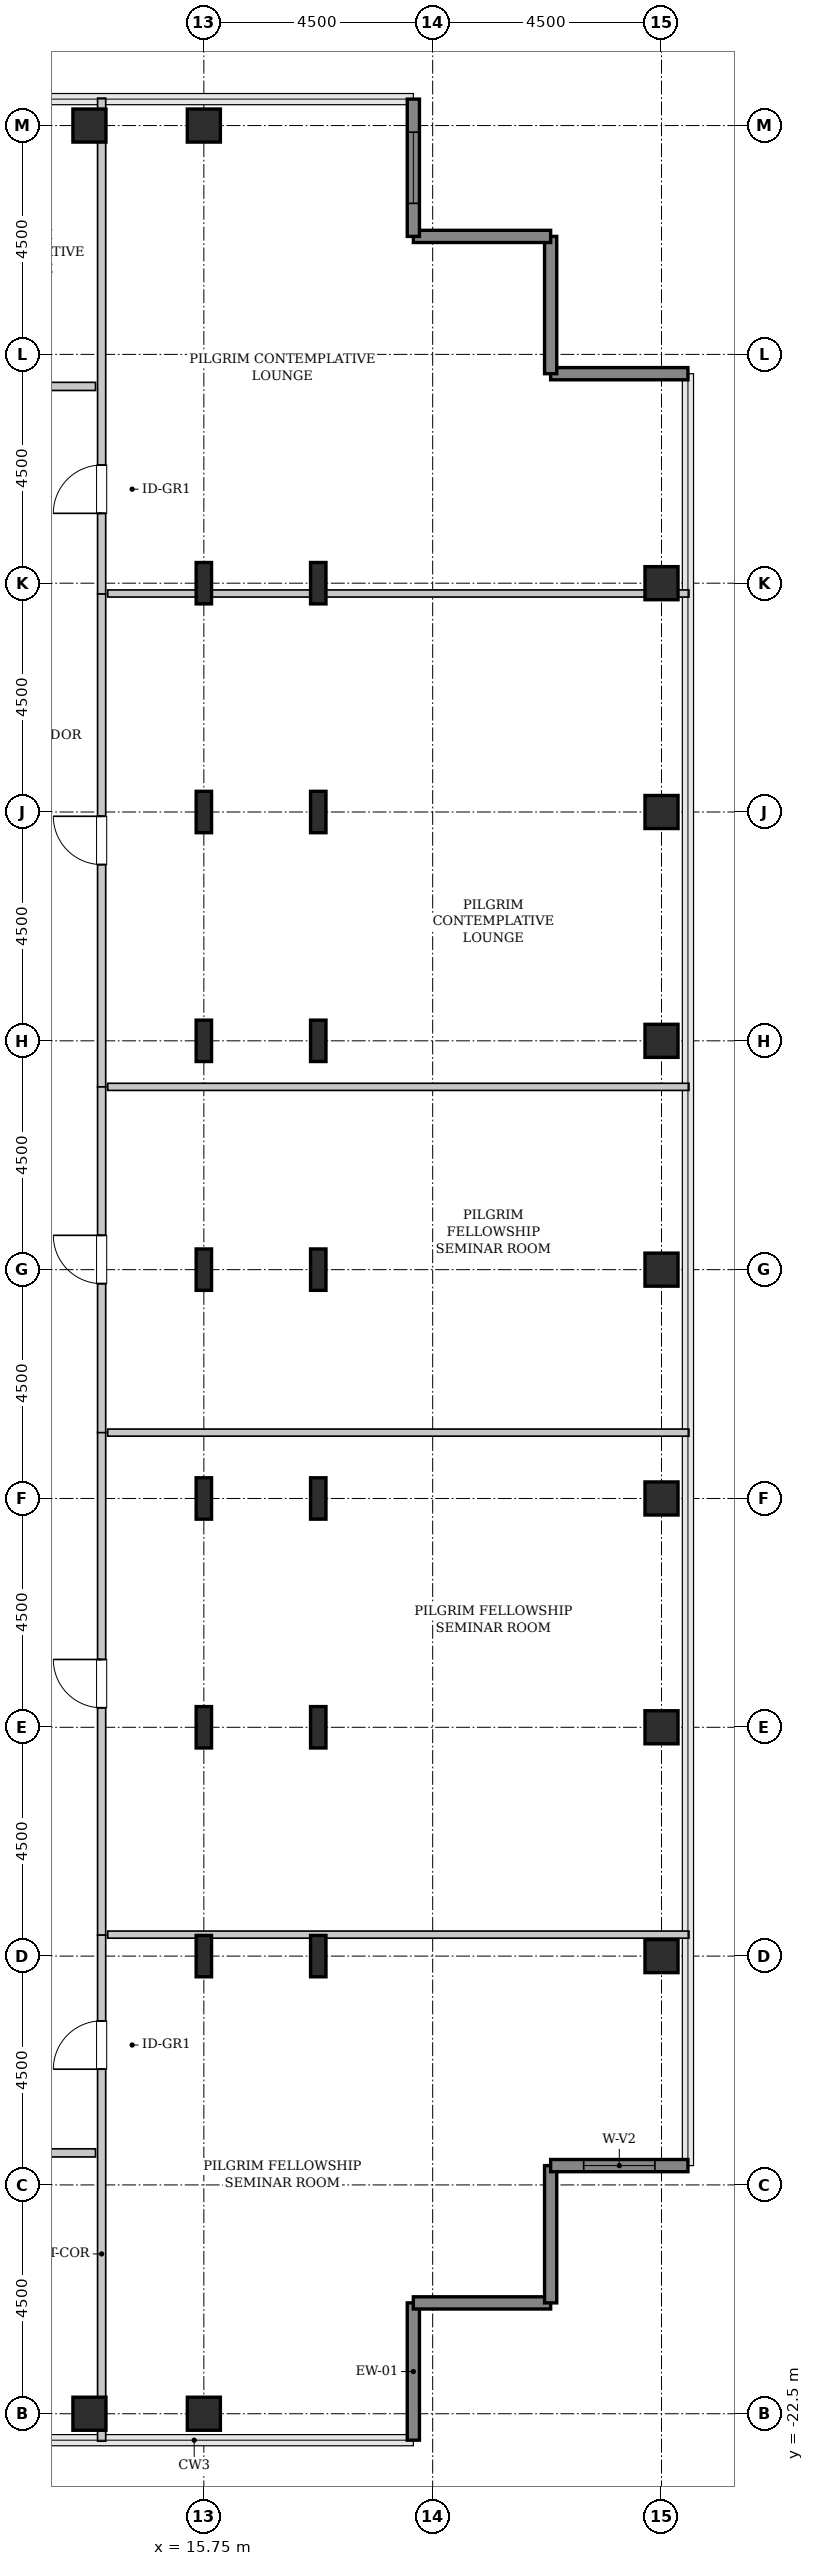
"""IFC4 building model, lengths in metres.
Left out: names, types, materials, properties, quantities, classifications, styles, units other than length and angle.
Written with IfcOpenShell. Run it as: python <this file> out.ifc"""

import sys

from ifc_helpers import new_model, si_unit, direction, frame, frame_2d, origin, origin_2d, place, context, subcontext, project, spatial, rectangle, hollow_rectangle, i_section, extrude, source, transform, mapped, element, fill, save


model = new_model("IFC4")
c1 = context("Model", 3, precision=1e-05, world=origin(), true_north=direction((0.0, 1.0)))
c2 = subcontext(c1, "Body", "Model", "MODEL_VIEW")
j1 = project(units=[si_unit("LENGTHUNIT", "METRE"), si_unit("PLANEANGLEUNIT", "RADIAN")], contexts=[c1])
p1 = place(None, origin())
s1 = spatial("IfcSite", under=j1, at=p1, CompositionType="ELEMENT")
p2 = place(p1, origin())
s2 = spatial("IfcBuilding", under=s1, at=p2, CompositionType="ELEMENT")
p3 = place(p2, frame((0.0, 0.0, 225.6)))
s3 = spatial("IfcBuildingStorey", under=s2, at=p3, CompositionType="ELEMENT", Elevation=225.6)
m1 = source(origin(), c2, "Body", "SweptSolid", [
    extrude(hollow_rectangle(XDim=0.65, YDim=0.65, WallThickness=0.032, InnerFilletRadius=0.032, OuterFilletRadius=0.064, at=origin_2d()), origin(), (0.0, 0.0, 1.0), 3.8),
])
for number, where, z_axis, x_axis in (
    (1, (13.5, -22.5, 0.0), (0.0, 0.0, 1.0), (1.0, 0.0, 0.0)),
    (2, (13.5, 22.5, 0.0), (0.0, 0.0, 1.0), (1.0, 0.0, 0.0)),
    (3, (15.75, -22.5, 0.0), (0.0, 0.0, 1.0), (1.0, 0.0, 0.0)),
):
    element("IfcColumn", number, at=place(p3, frame(where, z_axis=z_axis, x_axis=x_axis)), inside=s3, PredefinedType="COLUMN", context=c2, shape_type="MappedRepresentation", body=[
        mapped(m1, transform((0.0, 0.0, 0.0), x_axis=(1.0, 0.0, 0.0), y_axis=(0.0, 1.0, 0.0), z_axis=(0.0, 0.0, 1.0), scale=1.0)),
    ])
m2 = source(origin(), c2, "Body", "SweptSolid", [
    extrude(i_section(OverallWidth=0.303, OverallDepth=0.814, WebThickness=0.021, FlangeThickness=0.04, FilletRadius=0.03, at=origin_2d()), origin(), (0.0, 0.0, 1.0), 3.8),
])
for number, where, z_axis, x_axis in (
    (4, (15.75, -13.5, 0.0), (0.0, 0.0, 1.0), (1.0, 0.0, 0.0)),
    (5, (15.75, -9.0, 0.0), (0.0, 0.0, 1.0), (1.0, 0.0, 0.0)),
    (6, (15.75, -4.5, 0.0), (0.0, 0.0, 1.0), (1.0, 0.0, 0.0)),
    (7, (15.75, 0.0, 0.0), (0.0, 0.0, 1.0), (1.0, 0.0, 0.0)),
    (8, (15.75, 4.5, 0.0), (0.0, 0.0, 1.0), (1.0, 0.0, 0.0)),
    (9, (15.75, 9.0, 0.0), (0.0, 0.0, 1.0), (1.0, 0.0, 0.0)),
    (10, (15.75, 13.5, 0.0), (0.0, 0.0, 1.0), (1.0, 0.0, 0.0)),
):
    element("IfcColumn", number, at=place(p3, frame(where, z_axis=z_axis, x_axis=x_axis)), inside=s3, PredefinedType="COLUMN", context=c2, shape_type="MappedRepresentation", body=[
        mapped(m2, transform((0.0, 0.0, 0.0), x_axis=(1.0, 0.0, 0.0), y_axis=(0.0, 1.0, 0.0), z_axis=(0.0, 0.0, 1.0), scale=1.0)),
    ])
p4 = place(p3, frame((15.75, 22.5, 0.0), z_axis=(0.0, 0.0, 1.0), x_axis=(1.0, 0.0, 0.0)))
e11 = element("IfcColumn", 11, at=p4, inside=s3, PredefinedType="COLUMN", context=c2, shape_type="MappedRepresentation", body=[
    mapped(m1, transform((0.0, 0.0, 0.0), x_axis=(1.0, 0.0, 0.0), y_axis=(0.0, 1.0, 0.0), z_axis=(0.0, 0.0, 1.0), scale=1.0)),
])
for number, where, z_axis, x_axis in (
    (12, (18.0, -13.5, 0.0), (0.0, 0.0, 1.0), (1.0, 0.0, 0.0)),
    (13, (18.0, -9.0, 0.0), (0.0, 0.0, 1.0), (1.0, 0.0, 0.0)),
    (14, (18.0, -4.5, 0.0), (0.0, 0.0, 1.0), (1.0, 0.0, 0.0)),
    (15, (18.0, 0.0, 0.0), (0.0, 0.0, 1.0), (1.0, 0.0, 0.0)),
    (16, (18.0, 4.5, 0.0), (0.0, 0.0, 1.0), (1.0, 0.0, 0.0)),
    (17, (18.0, 9.0, 0.0), (0.0, 0.0, 1.0), (1.0, 0.0, 0.0)),
    (18, (18.0, 13.5, 0.0), (0.0, 0.0, 1.0), (1.0, 0.0, 0.0)),
):
    element("IfcColumn", number, at=place(p3, frame(where, z_axis=z_axis, x_axis=x_axis)), inside=s3, PredefinedType="COLUMN", context=c2, shape_type="MappedRepresentation", body=[
        mapped(m2, transform((0.0, 0.0, 0.0), x_axis=(1.0, 0.0, 0.0), y_axis=(0.0, 1.0, 0.0), z_axis=(0.0, 0.0, 1.0), scale=1.0)),
    ])
for number, where, z_axis, x_axis in (
    (19, (24.75, -13.5, 0.0), (0.0, 0.0, 1.0), (1.0, 0.0, 0.0)),
    (20, (24.75, -9.0, 0.0), (0.0, 0.0, 1.0), (1.0, 0.0, 0.0)),
    (21, (24.75, -4.5, 0.0), (0.0, 0.0, 1.0), (1.0, 0.0, 0.0)),
    (22, (24.75, 0.0, 0.0), (0.0, 0.0, 1.0), (1.0, 0.0, 0.0)),
    (23, (24.75, 4.5, 0.0), (0.0, 0.0, 1.0), (1.0, 0.0, 0.0)),
    (24, (24.75, 9.0, 0.0), (0.0, 0.0, 1.0), (1.0, 0.0, 0.0)),
    (25, (24.75, 13.5, 0.0), (0.0, 0.0, 1.0), (1.0, 0.0, 0.0)),
):
    element("IfcColumn", number, at=place(p3, frame(where, z_axis=z_axis, x_axis=x_axis)), inside=s3, PredefinedType="COLUMN", context=c2, shape_type="MappedRepresentation", body=[
        mapped(m1, transform((0.0, 0.0, 0.0), x_axis=(1.0, 0.0, 0.0), y_axis=(0.0, 1.0, 0.0), z_axis=(0.0, 0.0, 1.0), scale=1.0)),
    ])
m3 = source(origin(), c2, "Body", "SweptSolid", [
    extrude(rectangle(XDim=2.7, YDim=0.24, at=frame_2d((1.35, 0.0))), origin(), (0.0, 0.0, 1.0), 3.55),
])
for number, where, z_axis, x_axis in (
    (26, (19.87, -23.02, 0.0), (0.0, 0.0, 1.0), (0.0, 1.0, 0.0)),
    (27, (19.87, -20.32, 0.0), (0.0, 0.0, 1.0), (1.0, 0.0, 0.0)),
    (28, (22.57, -20.32, 0.0), (0.0, 0.0, 1.0), (0.0, 1.0, 0.0)),
):
    element("IfcWall", number, at=place(p3, frame(where, z_axis=z_axis, x_axis=x_axis)), inside=s3, PredefinedType="SHEAR", context=c2, shape_type="MappedRepresentation", body=[
        mapped(m3, transform((0.0, 0.0, 0.0), x_axis=(1.0, 0.0, 0.0), y_axis=(0.0, 1.0, 0.0), z_axis=(0.0, 0.0, 1.0), scale=1.0)),
    ])
p5 = place(p3, frame((22.57, -17.62, 0.0), z_axis=(0.0, 0.0, 1.0), x_axis=(1.0, 0.0, 0.0)))
e29 = element("IfcWall", 29, at=p5, inside=s3, PredefinedType="SHEAR", context=c2, shape_type="MappedRepresentation", body=[
    mapped(m3, transform((0.0, 0.0, 0.0), x_axis=(1.0, 0.0, 0.0), y_axis=(0.0, 1.0, 0.0), z_axis=(0.0, 0.0, 1.0), scale=1.0)),
])
p6 = place(p5, frame((0.65, 0.0, 0.85)))
e30 = element("IfcOpeningElement", 30, at=p6, cuts=e29, PredefinedType="OPENING", context=c2, shape_type="SweptSolid", body=[
    extrude(rectangle(XDim=1.4, YDim=1.8, at=frame_2d((0.7, 0.9))), frame((0.0, 0.13, 0.0), z_axis=(0.0, -1.0, 0.0), x_axis=(1.0, 0.0, 0.0)), (0.0, 0.0, 1.0), 0.26),
])
for number, where, z_axis, x_axis in (
    (31, (25.27, 17.62, 0.0), (0.0, 0.0, 1.0), (-1.0, 0.0, 0.0)),
    (32, (22.57, 17.62, 0.0), (0.0, 0.0, 1.0), (0.0, 1.0, 0.0)),
    (33, (22.57, 20.32, 0.0), (0.0, 0.0, 1.0), (-1.0, 0.0, 0.0)),
):
    element("IfcWall", number, at=place(p3, frame(where, z_axis=z_axis, x_axis=x_axis)), inside=s3, PredefinedType="SHEAR", context=c2, shape_type="MappedRepresentation", body=[
        mapped(m3, transform((0.0, 0.0, 0.0), x_axis=(1.0, 0.0, 0.0), y_axis=(0.0, 1.0, 0.0), z_axis=(0.0, 0.0, 1.0), scale=1.0)),
    ])
p7 = place(p3, frame((19.87, 20.32, 0.0), z_axis=(0.0, 0.0, 1.0), x_axis=(0.0, 1.0, 0.0)))
e34 = element("IfcWall", 34, at=p7, inside=s3, PredefinedType="SHEAR", context=c2, shape_type="MappedRepresentation", body=[
    mapped(m3, transform((0.0, 0.0, 0.0), x_axis=(1.0, 0.0, 0.0), y_axis=(0.0, 1.0, 0.0), z_axis=(0.0, 0.0, 1.0), scale=1.0)),
])
p8 = place(p7, frame((0.65, 0.0, 0.85)))
e35 = element("IfcOpeningElement", 35, at=p8, cuts=e34, PredefinedType="OPENING", context=c2, shape_type="SweptSolid", body=[
    extrude(rectangle(XDim=1.4, YDim=1.8, at=frame_2d((0.7, 0.9))), frame((0.0, 0.13, 0.0), z_axis=(0.0, -1.0, 0.0), x_axis=(1.0, 0.0, 0.0)), (0.0, 0.0, 1.0), 0.26),
])
m4 = source(origin(), c2, "Body", "SweptSolid", [
    extrude(rectangle(XDim=9.892, YDim=0.16, at=frame_2d((4.946, 0.0))), origin(), (0.0, 0.0, 1.0), 3.535),
])
p9 = place(p3, frame((13.74, -13.087, 0.0), z_axis=(0.0, 0.0, 1.0), x_axis=(0.0, 1.0, 0.0)))
e36 = element("IfcWall", 36, at=p9, inside=s3, PredefinedType="PARTITIONING", context=c2, shape_type="MappedRepresentation", body=[
    mapped(m4, transform((0.0, 0.0, 0.0), x_axis=(1.0, 0.0, 0.0), y_axis=(0.0, 1.0, 0.0), z_axis=(0.0, 0.0, 1.0), scale=1.0)),
])
p10 = place(p9, frame((4.471, 0.0, 0.0)))
e37 = element("IfcOpeningElement", 37, at=p10, cuts=e36, PredefinedType="OPENING", context=c2, shape_type="SweptSolid", body=[
    extrude(rectangle(XDim=0.95, YDim=2.1, at=frame_2d((0.475, 1.05))), frame((0.0, 0.09, 0.0), z_axis=(0.0, -1.0, 0.0), x_axis=(1.0, 0.0, 0.0)), (0.0, 0.0, 1.0), 0.18),
])
m5 = source(origin(), c2, "Body", "SweptSolid", [
    extrude(rectangle(XDim=11.43, YDim=0.14, at=frame_2d((5.715, 0.0))), origin(), (0.0, 0.0, 1.0), 2.925),
])
p11 = place(p3, frame((13.86, -13.077, 0.0), z_axis=(0.0, 0.0, 1.0), x_axis=(1.0, 0.0, 0.0)))
e38 = element("IfcWall", 38, at=p11, inside=s3, PredefinedType="PARTITIONING", context=c2, shape_type="MappedRepresentation", body=[
    mapped(m5, transform((0.0, 0.0, 0.0), x_axis=(1.0, 0.0, 0.0), y_axis=(0.0, 1.0, 0.0), z_axis=(0.0, 0.0, 1.0), scale=1.0)),
])
m6 = source(origin(), c2, "Body", "SweptSolid", [
    extrude(rectangle(XDim=11.43, YDim=0.14, at=frame_2d((5.715, 0.0))), origin(), (0.0, 0.0, 1.0), 3.535),
])
p12 = place(p3, frame((13.86, -3.205, 0.0), z_axis=(0.0, 0.0, 1.0), x_axis=(1.0, 0.0, 0.0)))
e39 = element("IfcWall", 39, at=p12, inside=s3, PredefinedType="PARTITIONING", context=c2, shape_type="MappedRepresentation", body=[
    mapped(m6, transform((0.0, 0.0, 0.0), x_axis=(1.0, 0.0, 0.0), y_axis=(0.0, 1.0, 0.0), z_axis=(0.0, 0.0, 1.0), scale=1.0)),
])
m7 = source(origin(), c2, "Body", "SweptSolid", [
    extrude(rectangle(XDim=9.953, YDim=0.16, at=frame_2d((4.976, 0.0))), origin(), (0.0, 0.0, 1.0), 3.535),
])
p13 = place(p3, frame((13.74, -23.04, 0.0), z_axis=(0.0, 0.0, 1.0), x_axis=(0.0, 1.0, 0.0)))
e40 = element("IfcWall", 40, at=p13, inside=s3, PredefinedType="PARTITIONING", context=c2, shape_type="MappedRepresentation", body=[
    mapped(m7, transform((0.0, 0.0, 0.0), x_axis=(1.0, 0.0, 0.0), y_axis=(0.0, 1.0, 0.0), z_axis=(0.0, 0.0, 1.0), scale=1.0)),
])
p14 = place(p13, frame((7.316, 0.0, 0.0)))
e41 = element("IfcOpeningElement", 41, at=p14, cuts=e40, PredefinedType="OPENING", context=c2, shape_type="SweptSolid", body=[
    extrude(rectangle(XDim=0.95, YDim=2.1, at=frame_2d((0.475, 1.05))), frame((0.0, 0.09, 0.0), z_axis=(0.0, -1.0, 0.0), x_axis=(1.0, 0.0, 0.0)), (0.0, 0.0, 1.0), 0.18),
])
m8 = source(origin(), c2, "Body", "SweptSolid", [
    extrude(rectangle(XDim=6.81, YDim=0.16, at=frame_2d((3.405, 0.0))), origin(), (0.0, 0.0, 1.0), 3.535),
])
p15 = place(p3, frame((13.74, -3.205, 0.0), z_axis=(0.0, 0.0, 1.0), x_axis=(0.0, 1.0, 0.0)))
e42 = element("IfcWall", 42, at=p15, inside=s3, PredefinedType="PARTITIONING", context=c2, shape_type="MappedRepresentation", body=[
    mapped(m8, transform((0.0, 0.0, 0.0), x_axis=(1.0, 0.0, 0.0), y_axis=(0.0, 1.0, 0.0), z_axis=(0.0, 0.0, 1.0), scale=1.0)),
])
p16 = place(p15, frame((2.93, 0.0, 0.0)))
e43 = element("IfcOpeningElement", 43, at=p16, cuts=e42, PredefinedType="OPENING", context=c2, shape_type="SweptSolid", body=[
    extrude(rectangle(XDim=0.95, YDim=2.1, at=frame_2d((0.475, 1.05))), frame((0.0, 0.09, 0.0), z_axis=(0.0, -1.0, 0.0), x_axis=(1.0, 0.0, 0.0)), (0.0, 0.0, 1.0), 0.18),
])
p17 = place(p3, frame((13.86, 3.595, 0.0), z_axis=(0.0, 0.0, 1.0), x_axis=(1.0, 0.0, 0.0)))
e44 = element("IfcWall", 44, at=p17, inside=s3, PredefinedType="PARTITIONING", context=c2, shape_type="MappedRepresentation", body=[
    mapped(m6, transform((0.0, 0.0, 0.0), x_axis=(1.0, 0.0, 0.0), y_axis=(0.0, 1.0, 0.0), z_axis=(0.0, 0.0, 1.0), scale=1.0)),
])
m9 = source(origin(), c2, "Body", "SweptSolid", [
    extrude(rectangle(XDim=9.752, YDim=0.16, at=frame_2d((4.876, 0.0))), origin(), (0.0, 0.0, 1.0), 3.535),
])
p18 = place(p3, frame((13.74, 13.288, 0.0), z_axis=(0.0, 0.0, 1.0), x_axis=(0.0, 1.0, 0.0)))
e45 = element("IfcWall", 45, at=p18, inside=s3, PredefinedType="PARTITIONING", context=c2, shape_type="MappedRepresentation", body=[
    mapped(m9, transform((0.0, 0.0, 0.0), x_axis=(1.0, 0.0, 0.0), y_axis=(0.0, 1.0, 0.0), z_axis=(0.0, 0.0, 1.0), scale=1.0)),
])
p19 = place(p18, frame((1.586, 0.0, 0.0)))
e46 = element("IfcOpeningElement", 46, at=p19, cuts=e45, PredefinedType="OPENING", context=c2, shape_type="SweptSolid", body=[
    extrude(rectangle(XDim=0.95, YDim=2.1, at=frame_2d((0.475, 1.05))), frame((0.0, 0.09, 0.0), z_axis=(0.0, -1.0, 0.0), x_axis=(1.0, 0.0, 0.0)), (0.0, 0.0, 1.0), 0.18),
])
p20 = place(p3, frame((13.86, 13.298, 0.0), z_axis=(0.0, 0.0, 1.0), x_axis=(1.0, 0.0, 0.0)))
e47 = element("IfcWall", 47, at=p20, inside=s3, PredefinedType="PARTITIONING", context=c2, shape_type="MappedRepresentation", body=[
    mapped(m5, transform((0.0, 0.0, 0.0), x_axis=(1.0, 0.0, 0.0), y_axis=(0.0, 1.0, 0.0), z_axis=(0.0, 0.0, 1.0), scale=1.0)),
])
m10 = source(origin(), c2, "Body", "SweptSolid", [
    extrude(rectangle(XDim=9.693, YDim=0.16, at=frame_2d((4.846, 0.0))), origin(), (0.0, 0.0, 1.0), 3.535),
])
p21 = place(p3, frame((13.74, 3.595, 0.0), z_axis=(0.0, 0.0, 1.0), x_axis=(0.0, 1.0, 0.0)))
e48 = element("IfcWall", 48, at=p21, inside=s3, PredefinedType="PARTITIONING", context=c2, shape_type="MappedRepresentation", body=[
    mapped(m10, transform((0.0, 0.0, 0.0), x_axis=(1.0, 0.0, 0.0), y_axis=(0.0, 1.0, 0.0), z_axis=(0.0, 0.0, 1.0), scale=1.0)),
])
p22 = place(p21, frame((4.371, 0.0, 0.0)))
e49 = element("IfcOpeningElement", 49, at=p22, cuts=e48, PredefinedType="OPENING", context=c2, shape_type="SweptSolid", body=[
    extrude(rectangle(XDim=0.95, YDim=2.1, at=frame_2d((0.475, 1.05))), frame((0.0, 0.09, 0.0), z_axis=(0.0, -1.0, 0.0), x_axis=(1.0, 0.0, 0.0)), (0.0, 0.0, 1.0), 0.18),
])
m11 = source(origin(), c2, "Body", "SweptSolid", [
    extrude(rectangle(XDim=10.478, YDim=0.16, at=frame_2d((5.239, 0.0))), origin(), (0.0, 0.0, 1.0), 3.535),
])
p23 = place(p3, frame((3.143, 17.37, 0.0), z_axis=(0.0, 0.0, 1.0), x_axis=(1.0, 0.0, 0.0)))
e50 = element("IfcWall", 50, at=p23, inside=s3, PredefinedType="PARTITIONING", context=c2, shape_type="MappedRepresentation", body=[
    mapped(m11, transform((0.0, 0.0, 0.0), x_axis=(1.0, 0.0, 0.0), y_axis=(0.0, 1.0, 0.0), z_axis=(0.0, 0.0, 1.0), scale=1.0)),
])
p24 = place(p23, frame((4.764, 0.0, 0.0)))
e51 = element("IfcOpeningElement", 51, at=p24, cuts=e50, PredefinedType="OPENING", context=c2, shape_type="SweptSolid", body=[
    extrude(rectangle(XDim=0.95, YDim=2.1, at=frame_2d((0.475, 1.05))), frame((0.0, 0.09, 0.0), z_axis=(0.0, -1.0, 0.0), x_axis=(1.0, 0.0, 0.0)), (0.0, 0.0, 1.0), 0.18),
])
m12 = source(origin(), c2, "Body", "SweptSolid", [
    extrude(rectangle(XDim=9.425, YDim=0.16, at=frame_2d((4.712, 0.0))), origin(), (0.0, 0.0, 1.0), 3.535),
])
p25 = place(p3, frame((4.195, -17.37, 0.0), z_axis=(0.0, 0.0, 1.0), x_axis=(1.0, 0.0, 0.0)))
e52 = element("IfcWall", 52, at=p25, inside=s3, PredefinedType="PARTITIONING", context=c2, shape_type="MappedRepresentation", body=[
    mapped(m12, transform((0.0, 0.0, 0.0), x_axis=(1.0, 0.0, 0.0), y_axis=(0.0, 1.0, 0.0), z_axis=(0.0, 0.0, 1.0), scale=1.0)),
])
p26 = place(p25, frame((4.238, 0.0, 0.0)))
e53 = element("IfcOpeningElement", 53, at=p26, cuts=e52, PredefinedType="OPENING", context=c2, shape_type="SweptSolid", body=[
    extrude(rectangle(XDim=0.95, YDim=2.1, at=frame_2d((0.475, 1.05))), frame((0.0, 0.09, 0.0), z_axis=(0.0, -1.0, 0.0), x_axis=(1.0, 0.0, 0.0)), (0.0, 0.0, 1.0), 0.18),
])
m13 = source(origin(), c2, "Body", "SweptSolid", [
    extrude(rectangle(XDim=1.4, YDim=1.8, at=frame_2d((0.7, 0.9))), frame((0.0, 0.03, 0.0), z_axis=(0.0, -1.0, 0.0), x_axis=(1.0, 0.0, 0.0)), (0.0, 0.0, 1.0), 0.06),
])
p27 = place(p6, origin())
e54 = element("IfcWindow", 54, at=p27, inside=s3, PartitioningType="SINGLE_PANEL", PredefinedType="WINDOW", context=c2, shape_type="MappedRepresentation", body=[
    mapped(m13, transform((0.0, 0.0, 0.0), x_axis=(1.0, 0.0, 0.0), y_axis=(0.0, 1.0, 0.0), z_axis=(0.0, 0.0, 1.0), scale=1.0)),
])
fill(e30, e54)
p28 = place(p8, origin())
e55 = element("IfcWindow", 55, at=p28, inside=s3, PartitioningType="SINGLE_PANEL", PredefinedType="WINDOW", context=c2, shape_type="MappedRepresentation", body=[
    mapped(m13, transform((0.0, 0.0, 0.0), x_axis=(1.0, 0.0, 0.0), y_axis=(0.0, 1.0, 0.0), z_axis=(0.0, 0.0, 1.0), scale=1.0)),
])
fill(e35, e55)
m14 = source(origin(), c2, "Body", "SweptSolid", [
    extrude(rectangle(XDim=0.95, YDim=2.1, at=frame_2d((0.475, 1.05))), frame((0.0, 0.025, 0.0), z_axis=(0.0, -1.0, 0.0), x_axis=(1.0, 0.0, 0.0)), (0.0, 0.0, 1.0), 0.05),
])
p29 = place(p10, origin())
e56 = element("IfcDoor", 56, at=p29, inside=s3, OperationType="SINGLE_SWING_RIGHT", PredefinedType="DOOR", context=c2, shape_type="MappedRepresentation", body=[
    mapped(m14, transform((0.0, 0.0, 0.0), x_axis=(1.0, 0.0, 0.0), y_axis=(0.0, 1.0, 0.0), z_axis=(0.0, 0.0, 1.0), scale=1.0)),
])
fill(e37, e56)
p30 = place(p14, origin())
e57 = element("IfcDoor", 57, at=p30, inside=s3, OperationType="SINGLE_SWING_LEFT", PredefinedType="DOOR", context=c2, shape_type="MappedRepresentation", body=[
    mapped(m14, transform((0.0, 0.0, 0.0), x_axis=(1.0, 0.0, 0.0), y_axis=(0.0, 1.0, 0.0), z_axis=(0.0, 0.0, 1.0), scale=1.0)),
])
fill(e41, e57)
p31 = place(p16, origin())
e58 = element("IfcDoor", 58, at=p31, inside=s3, OperationType="SINGLE_SWING_RIGHT", PredefinedType="DOOR", context=c2, shape_type="MappedRepresentation", body=[
    mapped(m14, transform((0.0, 0.0, 0.0), x_axis=(1.0, 0.0, 0.0), y_axis=(0.0, 1.0, 0.0), z_axis=(0.0, 0.0, 1.0), scale=1.0)),
])
fill(e43, e58)
p32 = place(p19, origin())
e59 = element("IfcDoor", 59, at=p32, inside=s3, OperationType="SINGLE_SWING_LEFT", PredefinedType="DOOR", context=c2, shape_type="MappedRepresentation", body=[
    mapped(m14, transform((0.0, 0.0, 0.0), x_axis=(1.0, 0.0, 0.0), y_axis=(0.0, 1.0, 0.0), z_axis=(0.0, 0.0, 1.0), scale=1.0)),
])
fill(e46, e59)
p33 = place(p22, origin())
e60 = element("IfcDoor", 60, at=p33, inside=s3, OperationType="SINGLE_SWING_RIGHT", PredefinedType="DOOR", context=c2, shape_type="MappedRepresentation", body=[
    mapped(m14, transform((0.0, 0.0, 0.0), x_axis=(1.0, 0.0, 0.0), y_axis=(0.0, 1.0, 0.0), z_axis=(0.0, 0.0, 1.0), scale=1.0)),
])
fill(e49, e60)
save(model, sys.argv[1])
